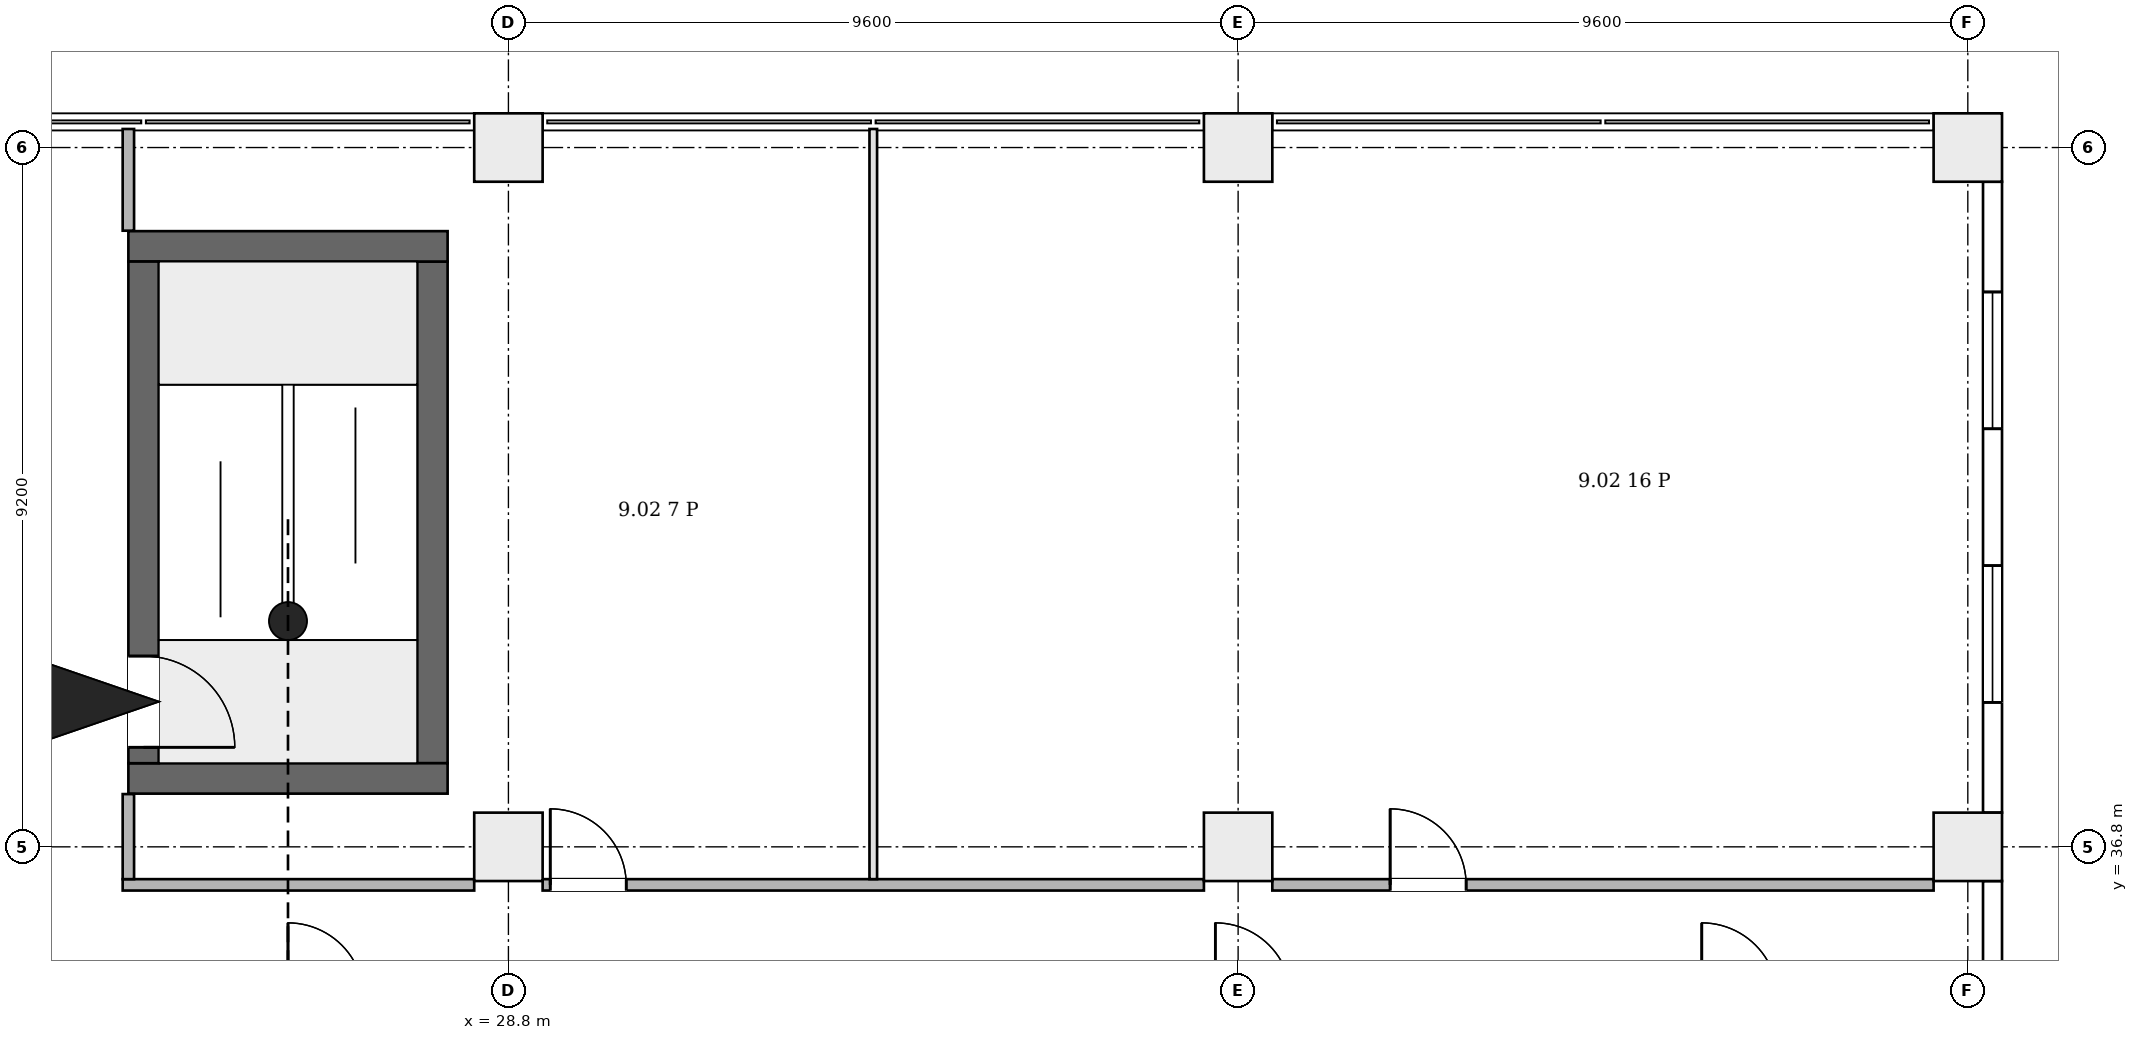
"""IFC4 building model, lengths in metres.
Left out: names, types, materials, properties, quantities, classifications, styles, units other than length and angle.
Written with IfcOpenShell. Run it as: python <this file> out.ifc"""

import sys

from ifc_helpers import new_model, si_unit, direction, frame, frame_2d, origin, origin_2d, place, context, subcontext, project, spatial, rectangle, extrude, element, fill, save


model = new_model("IFC4")
c1 = context("Model", 3, precision=1e-05, world=origin(), true_north=direction((0.0, 1.0)))
c2 = subcontext(c1, "Body", "Model", "MODEL_VIEW")
j1 = project(units=[si_unit("LENGTHUNIT", "METRE"), si_unit("PLANEANGLEUNIT", "RADIAN")], contexts=[c1])
p1 = place(None, origin())
s1 = spatial("IfcSite", under=j1, at=p1, CompositionType="ELEMENT")
p2 = place(p1, origin())
s2 = spatial("IfcBuilding", under=s1, at=p2, CompositionType="ELEMENT")
p3 = place(p2, frame((0.0, 0.0, 48.7)))
s3 = spatial("IfcBuildingStorey", under=s2, at=p3, CompositionType="ELEMENT", Elevation=48.7)
for number, where, z_axis, x_axis in (
    (1, (23.8, 37.7, 0.0), (0.0, 0.0, 1.0), (1.0, 0.0, 0.0)),
    (2, (23.8, 44.7, 0.0), (0.0, 0.0, 1.0), (1.0, 0.0, 0.0)),
):
    element("IfcWall", number, at=place(p3, frame(where, z_axis=z_axis, x_axis=x_axis)), inside=s3, PredefinedType="SHEAR", context=c2, shape_type="SweptSolid", body=[
        extrude(rectangle(XDim=4.2, YDim=0.4, at=frame_2d((2.1, 0.0))), origin(), (0.0, 0.0, 1.0), 4.2),
    ])
p4 = place(p3, frame((24.0, 37.9, 0.0), z_axis=(0.0, 0.0, 1.0), x_axis=(0.0, 1.0, 0.0)))
e3 = element("IfcWall", 3, at=p4, inside=s3, PredefinedType="SHEAR", context=c2, shape_type="SweptSolid", body=[
    extrude(rectangle(XDim=6.6, YDim=0.4, at=frame_2d((3.3, 0.0))), origin(), (0.0, 0.0, 1.0), 4.2),
])
p5 = place(p4, frame((0.21, 0.0, 0.0)))
e4 = element("IfcOpeningElement", 4, at=p5, cuts=e3, PredefinedType="OPENING", context=c2, shape_type="SweptSolid", body=[
    extrude(rectangle(XDim=1.2, YDim=2.1, at=frame_2d((0.6, 1.05))), frame((0.0, 0.21, 0.0), z_axis=(0.0, -1.0, 0.0), x_axis=(1.0, 0.0, 0.0)), (0.0, 0.0, 1.0), 0.42),
])
p6 = place(p3, frame((27.8, 37.9, 0.0), z_axis=(0.0, 0.0, 1.0), x_axis=(0.0, 1.0, 0.0)))
e5 = element("IfcWall", 5, at=p6, inside=s3, PredefinedType="SHEAR", context=c2, shape_type="SweptSolid", body=[
    extrude(rectangle(XDim=6.6, YDim=0.4, at=frame_2d((3.3, 0.0))), origin(), (0.0, 0.0, 1.0), 4.2),
])
for number, where, z_axis, x_axis in (
    (6, (28.8, 36.8, 0.0), (0.0, 0.0, 1.0), (1.0, 0.0, 0.0)),
    (7, (38.4, 36.8, 0.0), (0.0, 0.0, 1.0), (1.0, 0.0, 0.0)),
    (8, (48.0, 36.8, 0.0), (0.0, 0.0, 1.0), (1.0, 0.0, 0.0)),
    (9, (28.8, 46.0, 0.0), (0.0, 0.0, 1.0), (1.0, 0.0, 0.0)),
    (10, (38.4, 46.0, 0.0), (0.0, 0.0, 1.0), (1.0, 0.0, 0.0)),
    (11, (48.0, 46.0, 0.0), (0.0, 0.0, 1.0), (1.0, 0.0, 0.0)),
):
    element("IfcColumn", number, at=place(p3, frame(where, z_axis=z_axis, x_axis=x_axis)), inside=s3, PredefinedType="COLUMN", context=c2, shape_type="SweptSolid", body=[
        extrude(rectangle(XDim=0.9, YDim=0.9, at=origin_2d()), origin(), (0.0, 0.0, 1.0), 4.2),
    ])
p7 = place(p3, frame((48.325, 28.05, 0.0), z_axis=(0.0, 0.0, 1.0), x_axis=(0.0, 1.0, 0.0)))
e12 = element("IfcWall", 12, at=p7, inside=s3, PredefinedType="ELEMENTEDWALL", context=c2, shape_type="SweptSolid", body=[
    extrude(rectangle(XDim=8.3, YDim=0.25, at=frame_2d((4.15, 0.0))), origin(), (0.0, 0.0, 1.0), 3.9),
])
p8 = place(p7, frame((1.45, 0.0, 0.9)))
e13 = element("IfcOpeningElement", 13, at=p8, cuts=e12, PredefinedType="OPENING", context=c2, shape_type="SweptSolid", body=[
    extrude(rectangle(XDim=1.8, YDim=2.6, at=frame_2d((0.9, 1.3))), frame((0.0, 0.135, 0.0), z_axis=(0.0, -1.0, 0.0), x_axis=(1.0, 0.0, 0.0)), (0.0, 0.0, 1.0), 0.27),
])
p9 = place(p7, frame((4.8, 0.0, 0.9)))
e14 = element("IfcOpeningElement", 14, at=p9, cuts=e12, PredefinedType="OPENING", context=c2, shape_type="SweptSolid", body=[
    extrude(rectangle(XDim=1.8, YDim=2.6, at=frame_2d((0.9, 1.3))), frame((0.0, 0.135, 0.0), z_axis=(0.0, -1.0, 0.0), x_axis=(1.0, 0.0, 0.0)), (0.0, 0.0, 1.0), 0.27),
])
p10 = place(p3, frame((48.325, 37.25, 0.0), z_axis=(0.0, 0.0, 1.0), x_axis=(0.0, 1.0, 0.0)))
e15 = element("IfcWall", 15, at=p10, inside=s3, PredefinedType="ELEMENTEDWALL", context=c2, shape_type="SweptSolid", body=[
    extrude(rectangle(XDim=8.3, YDim=0.25, at=frame_2d((4.15, 0.0))), origin(), (0.0, 0.0, 1.0), 3.9),
])
p11 = place(p10, frame((1.45, 0.0, 0.9)))
e16 = element("IfcOpeningElement", 16, at=p11, cuts=e15, PredefinedType="OPENING", context=c2, shape_type="SweptSolid", body=[
    extrude(rectangle(XDim=1.8, YDim=2.6, at=frame_2d((0.9, 1.3))), frame((0.0, 0.135, 0.0), z_axis=(0.0, -1.0, 0.0), x_axis=(1.0, 0.0, 0.0)), (0.0, 0.0, 1.0), 0.27),
])
p12 = place(p10, frame((5.05, 0.0, 0.9)))
e17 = element("IfcOpeningElement", 17, at=p12, cuts=e15, PredefinedType="OPENING", context=c2, shape_type="SweptSolid", body=[
    extrude(rectangle(XDim=1.8, YDim=2.6, at=frame_2d((0.9, 1.3))), frame((0.0, 0.135, 0.0), z_axis=(0.0, -1.0, 0.0), x_axis=(1.0, 0.0, 0.0)), (0.0, 0.0, 1.0), 0.27),
])
p13 = place(p3, frame((23.725, 36.3, 0.0), z_axis=(0.0, 0.0, 1.0), x_axis=(1.0, 0.0, 0.0)))
e18 = element("IfcWall", 18, at=p13, inside=s3, PredefinedType="PARTITIONING", context=c2, shape_type="SweptSolid", body=[
    extrude(rectangle(XDim=4.625, YDim=0.15, at=frame_2d((2.312, 0.0))), origin(), (0.0, 0.0, 1.0), 3.9),
])
p14 = place(p3, frame((23.8, 36.375, 0.0), z_axis=(0.0, 0.0, 1.0), x_axis=(0.0, 1.0, 0.0)))
e19 = element("IfcWall", 19, at=p14, inside=s3, PredefinedType="PARTITIONING", context=c2, shape_type="SweptSolid", body=[
    extrude(rectangle(XDim=1.119, YDim=0.15, at=frame_2d((0.56, 0.0))), origin(), (0.0, 0.0, 1.0), 3.9),
])
p15 = place(p3, frame((23.8, 44.906, 0.0), z_axis=(0.0, 0.0, 1.0), x_axis=(0.0, 1.0, 0.0)))
e20 = element("IfcWall", 20, at=p15, inside=s3, PredefinedType="PARTITIONING", context=c2, shape_type="SweptSolid", body=[
    extrude(rectangle(XDim=1.338, YDim=0.15, at=frame_2d((0.669, 0.0))), origin(), (0.0, 0.0, 1.0), 3.9),
])
p16 = place(p3, frame((29.25, 36.3, 0.0), z_axis=(0.0, 0.0, 1.0), x_axis=(1.0, 0.0, 0.0)))
e21 = element("IfcWall", 21, at=p16, inside=s3, PredefinedType="PARTITIONING", context=c2, shape_type="SweptSolid", body=[
    extrude(rectangle(XDim=8.7, YDim=0.15, at=frame_2d((4.35, 0.0))), origin(), (0.0, 0.0, 1.0), 3.9),
])
p17 = place(p16, frame((0.1, 0.0, 0.0)))
e22 = element("IfcOpeningElement", 22, at=p17, cuts=e21, PredefinedType="OPENING", context=c2, shape_type="SweptSolid", body=[
    extrude(rectangle(XDim=1.0, YDim=2.1, at=frame_2d((0.5, 1.05))), frame((0.0, 0.085, 0.0), z_axis=(0.0, -1.0, 0.0), x_axis=(1.0, 0.0, 0.0)), (0.0, 0.0, 1.0), 0.17),
])
p18 = place(p3, frame((33.6, 36.375, 0.0), z_axis=(0.0, 0.0, 1.0), x_axis=(0.0, 1.0, 0.0)))
e23 = element("IfcWall", 23, at=p18, inside=s3, PredefinedType="PARTITIONING", context=c2, shape_type="SweptSolid", body=[
    extrude(rectangle(XDim=9.869, YDim=0.1, at=frame_2d((4.935, 0.0))), origin(), (0.0, 0.0, 1.0), 3.9),
])
p19 = place(p3, frame((38.85, 36.3, 0.0), z_axis=(0.0, 0.0, 1.0), x_axis=(1.0, 0.0, 0.0)))
e24 = element("IfcWall", 24, at=p19, inside=s3, PredefinedType="PARTITIONING", context=c2, shape_type="SweptSolid", body=[
    extrude(rectangle(XDim=8.7, YDim=0.15, at=frame_2d((4.35, 0.0))), origin(), (0.0, 0.0, 1.0), 3.9),
])
p20 = place(p19, frame((1.55, 0.0, 0.0)))
e25 = element("IfcOpeningElement", 25, at=p20, cuts=e24, PredefinedType="OPENING", context=c2, shape_type="SweptSolid", body=[
    extrude(rectangle(XDim=1.0, YDim=2.1, at=frame_2d((0.5, 1.05))), frame((0.0, 0.085, 0.0), z_axis=(0.0, -1.0, 0.0), x_axis=(1.0, 0.0, 0.0)), (0.0, 0.0, 1.0), 0.17),
])
p21 = place(p11, origin())
e26 = element("IfcWindow", 26, at=p21, inside=s3, PartitioningType="SINGLE_PANEL", PredefinedType="WINDOW", context=c2, shape_type="SweptSolid", body=[
    extrude(rectangle(XDim=1.8, YDim=2.6, at=frame_2d((0.9, 1.3))), frame((0.0, 0.03, 0.0), z_axis=(0.0, -1.0, 0.0), x_axis=(1.0, 0.0, 0.0)), (0.0, 0.0, 1.0), 0.06),
])
fill(e16, e26)
p22 = place(p12, origin())
e27 = element("IfcWindow", 27, at=p22, inside=s3, PartitioningType="SINGLE_PANEL", PredefinedType="WINDOW", context=c2, shape_type="SweptSolid", body=[
    extrude(rectangle(XDim=1.8, YDim=2.6, at=frame_2d((0.9, 1.3))), frame((0.0, 0.03, 0.0), z_axis=(0.0, -1.0, 0.0), x_axis=(1.0, 0.0, 0.0)), (0.0, 0.0, 1.0), 0.06),
])
fill(e17, e27)
p23 = place(p5, origin())
e28 = element("IfcDoor", 28, at=p23, inside=s3, OperationType="SINGLE_SWING_LEFT", PredefinedType="DOOR", context=c2, shape_type="SweptSolid", body=[
    extrude(rectangle(XDim=1.2, YDim=2.1, at=frame_2d((0.6, 1.05))), frame((0.0, 0.025, 0.0), z_axis=(0.0, -1.0, 0.0), x_axis=(1.0, 0.0, 0.0)), (0.0, 0.0, 1.0), 0.05),
])
fill(e4, e28)
p24 = place(p17, origin())
e29 = element("IfcDoor", 29, at=p24, inside=s3, OperationType="SINGLE_SWING_LEFT", PredefinedType="DOOR", context=c2, shape_type="SweptSolid", body=[
    extrude(rectangle(XDim=1.0, YDim=2.1, at=frame_2d((0.5, 1.05))), frame((0.0, 0.025, 0.0), z_axis=(0.0, -1.0, 0.0), x_axis=(1.0, 0.0, 0.0)), (0.0, 0.0, 1.0), 0.05),
])
fill(e22, e29)
p25 = place(p20, origin())
e30 = element("IfcDoor", 30, at=p25, inside=s3, OperationType="SINGLE_SWING_RIGHT", PredefinedType="DOOR", context=c2, shape_type="SweptSolid", body=[
    extrude(rectangle(XDim=1.0, YDim=2.1, at=frame_2d((0.5, 1.05))), frame((0.0, 0.025, 0.0), z_axis=(0.0, -1.0, 0.0), x_axis=(1.0, 0.0, 0.0)), (0.0, 0.0, 1.0), 0.05),
])
fill(e25, e30)
save(model, sys.argv[1])
